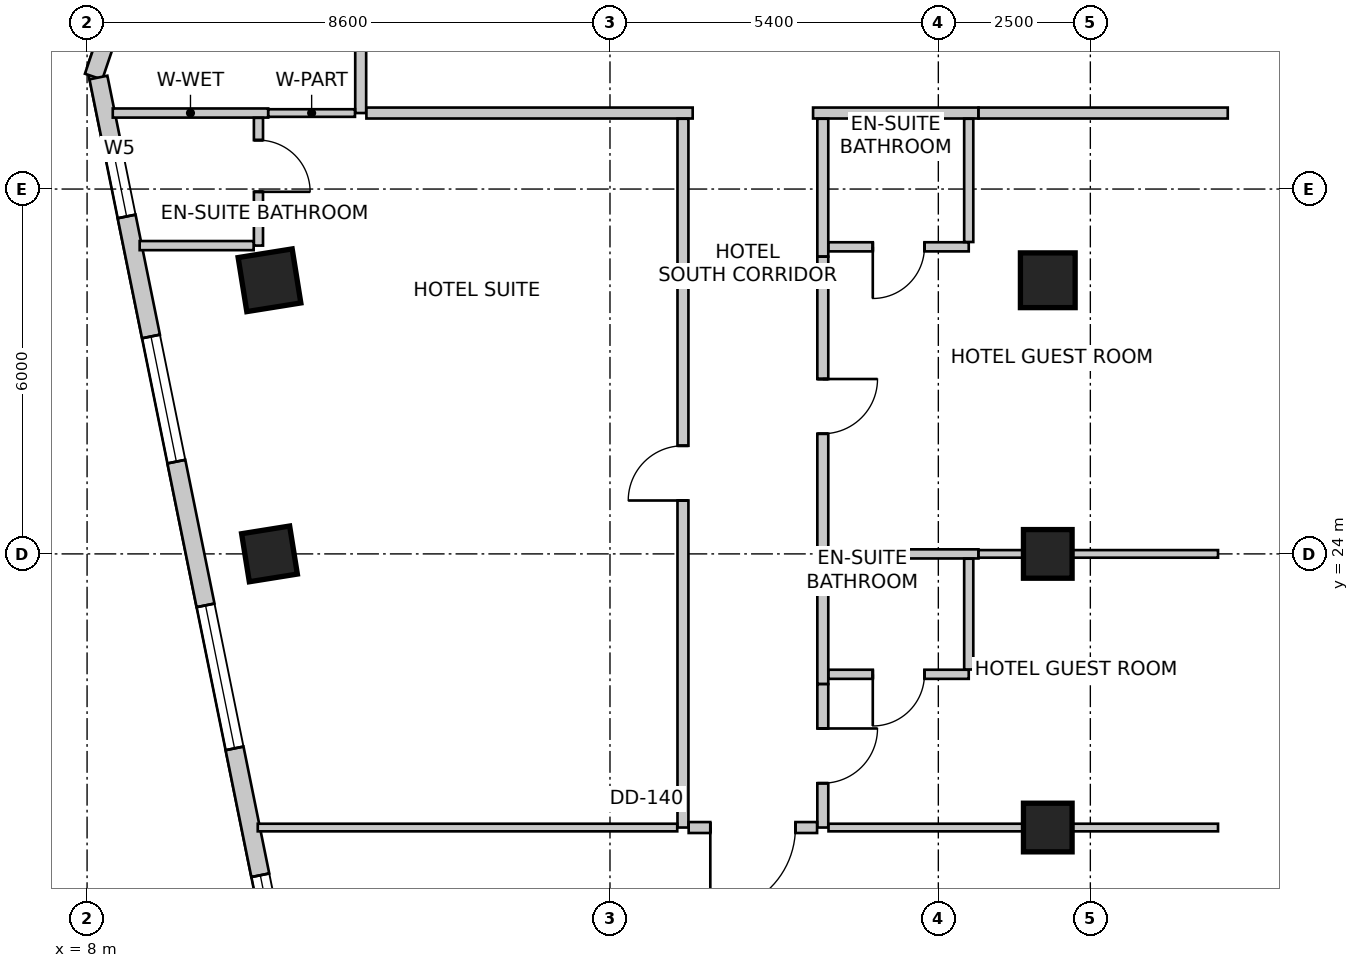
"""IFC4 building model, lengths in metres.
Left out: names, types, materials, properties, quantities, classifications, styles, units other than length and angle.
Written with IfcOpenShell. Run it as: python <this file> out.ifc"""

import sys

from ifc_helpers import new_model, si_unit, direction, frame, frame_2d, origin, origin_2d, place, context, subcontext, project, spatial, rectangle, extrude, source, transform, mapped, element, fill, save


model = new_model("IFC4")
c1 = context("Model", 3, precision=1e-05, world=origin(), true_north=direction((0.0, 1.0)))
c2 = subcontext(c1, "Body", "Model", "MODEL_VIEW")
j1 = project(units=[si_unit("LENGTHUNIT", "METRE"), si_unit("PLANEANGLEUNIT", "RADIAN")], contexts=[c1])
p1 = place(None, origin())
s1 = spatial("IfcSite", under=j1, at=p1, CompositionType="ELEMENT")
p2 = place(p1, origin())
s2 = spatial("IfcBuilding", under=s1, at=p2, CompositionType="ELEMENT")
p3 = place(p2, frame((0.0, 0.0, 146.6)))
s3 = spatial("IfcBuildingStorey", under=s2, at=p3, CompositionType="ELEMENT", Elevation=146.6)
m1 = source(origin(), c2, "Body", "SweptSolid", [
    extrude(rectangle(XDim=0.9, YDim=0.9, at=origin_2d()), origin(), (0.0, 0.0, 1.0), 3.6),
])
p4 = place(p3, frame((11.0, 28.5, 0.0), z_axis=(0.0, 0.0, 1.0), x_axis=(0.158158067254, -0.987413806751, 0.0)))
e1 = element("IfcColumn", 1, at=p4, inside=s3, PredefinedType="COLUMN", context=c2, shape_type="MappedRepresentation", body=[
    mapped(m1, transform((0.0, 0.0, 0.0), scale=1.0)),
])
m2 = source(origin(), c2, "Body", "SweptSolid", [
    extrude(rectangle(XDim=0.8, YDim=0.8, at=origin_2d()), origin(), (0.0, 0.0, 1.0), 3.6),
])
p5 = place(p3, frame((11.0, 24.0, 0.0), z_axis=(0.0, 0.0, 1.0), x_axis=(0.158158067254, -0.987413806751, 0.0)))
e2 = element("IfcColumn", 2, at=p5, inside=s3, PredefinedType="COLUMN", context=c2, shape_type="MappedRepresentation", body=[
    mapped(m2, transform((0.0, 0.0, 0.0), scale=1.0)),
])
p6 = place(p3, frame((23.8, 28.5, 0.0), z_axis=(0.0, 0.0, 1.0), x_axis=(1.0, 0.0, 0.0)))
e3 = element("IfcColumn", 3, at=p6, inside=s3, PredefinedType="COLUMN", context=c2, shape_type="MappedRepresentation", body=[
    mapped(m1, transform((0.0, 0.0, 0.0), scale=1.0)),
])
for number, where, z_axis, x_axis in (
    (4, (23.8, 24.0, 0.0), (0.0, 0.0, 1.0), (1.0, 0.0, 0.0)),
    (5, (23.8, 19.5, 0.0), (0.0, 0.0, 1.0), (1.0, 0.0, 0.0)),
):
    element("IfcColumn", number, at=place(p3, frame(where, z_axis=z_axis, x_axis=x_axis)), inside=s3, PredefinedType="COLUMN", context=c2, shape_type="MappedRepresentation", body=[
        mapped(m2, transform((0.0, 0.0, 0.0), scale=1.0)),
    ])
p7 = place(p3, frame((13.269, 47.134, 0.0), z_axis=(0.0, 0.0, 1.0), x_axis=(-0.319929773322, -0.947441259468, 0.0)))
e6 = element("IfcWall", 6, at=p7, inside=s3, PredefinedType="SOLIDWALL", context=c2, shape_type="SweptSolid", body=[
    extrude(rectangle(XDim=16.134, YDim=0.3, at=frame_2d((8.067, 0.0))), origin(), (0.0, 0.0, 1.0), 3.35),
])
m3 = source(origin(), c2, "Body", "SweptSolid", [
    extrude(rectangle(XDim=2.4, YDim=2.2, at=frame_2d((1.2, 1.1))), frame((0.0, 0.16, 0.0), z_axis=(0.0, -1.0, 0.0), x_axis=(1.0, 0.0, 0.0)), (0.0, 0.0, 1.0), 0.32),
])
p8 = place(p7, frame((2.276, 0.0, 0.85)))
e7 = element("IfcOpeningElement", 7, at=p8, cuts=e6, PredefinedType="OPENING", context=c2, shape_type="MappedRepresentation", body=[
    mapped(m3, transform((0.0, 0.0, 0.0), scale=1.0)),
])
m4 = source(origin(), c2, "Body", "SweptSolid", [
    extrude(rectangle(XDim=2.1, YDim=2.0, at=frame_2d((1.05, 1.0))), frame((0.0, 0.16, 0.0), z_axis=(0.0, -1.0, 0.0), x_axis=(1.0, 0.0, 0.0)), (0.0, 0.0, 1.0), 0.32),
])
p9 = place(p7, frame((7.361, 0.0, 0.85)))
e8 = element("IfcOpeningElement", 8, at=p9, cuts=e6, PredefinedType="OPENING", context=c2, shape_type="MappedRepresentation", body=[
    mapped(m4, transform((0.0, 0.0, 0.0), scale=1.0)),
])
p10 = place(p7, frame((12.146, 0.0, 0.85)))
e9 = element("IfcOpeningElement", 9, at=p10, cuts=e6, PredefinedType="OPENING", context=c2, shape_type="MappedRepresentation", body=[
    mapped(m3, transform((0.0, 0.0, 0.0), scale=1.0)),
])
p11 = place(p3, frame((8.187, 31.834, 0.0), z_axis=(0.0, 0.0, 1.0), x_axis=(0.198869838988, -0.980025911464, 0.0)))
e10 = element("IfcWall", 10, at=p11, inside=s3, PredefinedType="SOLIDWALL", context=c2, shape_type="SweptSolid", body=[
    extrude(rectangle(XDim=16.363, YDim=0.3, at=frame_2d((8.182, 0.0))), origin(), (0.0, 0.0, 1.0), 3.35),
])
m5 = source(origin(), c2, "Body", "SweptSolid", [
    extrude(rectangle(XDim=1.2, YDim=1.6, at=frame_2d((0.6, 0.8))), frame((0.0, 0.16, 0.0), z_axis=(0.0, -1.0, 0.0), x_axis=(1.0, 0.0, 0.0)), (0.0, 0.0, 1.0), 0.32),
])
p12 = place(p11, frame((1.131, 0.0, 0.85)))
e11 = element("IfcOpeningElement", 11, at=p12, cuts=e10, PredefinedType="OPENING", context=c2, shape_type="MappedRepresentation", body=[
    mapped(m5, transform((0.0, 0.0, 0.0), scale=1.0)),
])
p13 = place(p11, frame((4.345, 0.0, 0.85)))
e12 = element("IfcOpeningElement", 12, at=p13, cuts=e10, PredefinedType="OPENING", context=c2, shape_type="MappedRepresentation", body=[
    mapped(m4, transform((0.0, 0.0, 0.0), scale=1.0)),
])
p14 = place(p11, frame((8.857, 0.0, 0.85)))
e13 = element("IfcOpeningElement", 13, at=p14, cuts=e10, PredefinedType="OPENING", context=c2, shape_type="MappedRepresentation", body=[
    mapped(m3, transform((0.0, 0.0, 0.0), scale=1.0)),
])
p15 = place(p11, frame((13.386, 0.0, 0.85)))
e14 = element("IfcOpeningElement", 14, at=p15, cuts=e10, PredefinedType="OPENING", context=c2, shape_type="MappedRepresentation", body=[
    mapped(m4, transform((0.0, 0.0, 0.0), scale=1.0)),
])
p16 = place(p3, frame((12.5, 31.25, 0.0), z_axis=(0.0, 0.0, 1.0), x_axis=(0.0, 1.0, 0.0)))
e15 = element("IfcWall", 15, at=p16, inside=s3, PredefinedType="PARTITIONING", context=c2, shape_type="SweptSolid", body=[
    extrude(rectangle(XDim=2.2, YDim=0.18, at=frame_2d((1.1, 0.0))), origin(), (0.0, 0.0, 1.0), 2.935),
])
p17 = place(p3, frame((17.96, 31.25, 0.0), z_axis=(0.0, 0.0, 1.0), x_axis=(-1.0, 0.0, 0.0)))
e16 = element("IfcWall", 16, at=p17, inside=s3, PredefinedType="PARTITIONING", context=c2, shape_type="SweptSolid", body=[
    extrude(rectangle(XDim=5.366, YDim=0.18, at=frame_2d((2.683, 0.0))), origin(), (0.0, 0.0, 1.0), 2.935),
])
p18 = place(p3, frame((22.66, 31.25, 0.0), z_axis=(0.0, 0.0, 1.0), x_axis=(-1.0, 0.0, 0.0)))
e17 = element("IfcWall", 17, at=p18, inside=s3, PredefinedType="PARTITIONING", context=c2, shape_type="SweptSolid", body=[
    extrude(rectangle(XDim=2.72, YDim=0.18, at=frame_2d((1.36, 0.0))), origin(), (0.0, 0.0, 1.0), 2.935),
])
p19 = place(p3, frame((26.76, 31.25, 0.0), z_axis=(0.0, 0.0, 1.0), x_axis=(-1.0, 0.0, 0.0)))
e18 = element("IfcWall", 18, at=p19, inside=s3, PredefinedType="PARTITIONING", context=c2, shape_type="SweptSolid", body=[
    extrude(rectangle(XDim=4.098, YDim=0.18, at=frame_2d((2.049, 0.0))), origin(), (0.0, 0.0, 1.0), 3.35),
])
p20 = place(p3, frame((10.979, 31.25, 0.0), z_axis=(0.0, 0.0, 1.0), x_axis=(-1.0, 0.0, 0.0)))
e19 = element("IfcWall", 19, at=p20, inside=s3, PredefinedType="PARTITIONING", context=c2, shape_type="SweptSolid", body=[
    extrude(rectangle(XDim=2.556, YDim=0.15, at=frame_2d((1.278, 0.0))), origin(), (0.0, 0.0, 1.0), 2.492),
])
p21 = place(p3, frame((12.406, 31.25, 0.0), z_axis=(0.0, 0.0, 1.0), x_axis=(-1.0, 0.0, 0.0)))
e20 = element("IfcWall", 20, at=p21, inside=s3, PredefinedType="PARTITIONING", context=c2, shape_type="SweptSolid", body=[
    extrude(rectangle(XDim=1.426, YDim=0.125, at=frame_2d((0.713, 0.0))), origin(), (0.0, 0.0, 1.0), 2.492),
])
p22 = place(p3, frame((17.8, 19.5, 0.0), z_axis=(0.0, 0.0, 1.0), x_axis=(0.0, 1.0, 0.0)))
e21 = element("IfcWall", 21, at=p22, inside=s3, PredefinedType="PARTITIONING", context=c2, shape_type="SweptSolid", body=[
    extrude(rectangle(XDim=11.656, YDim=0.18, at=frame_2d((5.828, 0.0))), origin(), (0.0, 0.0, 1.0), 2.788),
])
m6 = source(origin(), c2, "Body", "SweptSolid", [
    extrude(rectangle(XDim=0.9, YDim=2.15, at=frame_2d((0.45, 1.075))), frame((0.0, 0.1, 0.0), z_axis=(0.0, -1.0, 0.0), x_axis=(1.0, 0.0, 0.0)), (0.0, 0.0, 1.0), 0.2),
])
p23 = place(p22, frame((5.378, 0.0, 0.0)))
e22 = element("IfcOpeningElement", 22, at=p23, cuts=e21, PredefinedType="OPENING", context=c2, shape_type="MappedRepresentation", body=[
    mapped(m6, transform((0.0, 0.0, 0.0), scale=1.0)),
])
p24 = place(p3, frame((20.1, 31.156, 0.0), z_axis=(0.0, 0.0, 1.0), x_axis=(0.0, -1.0, 0.0)))
e23 = element("IfcWall", 23, at=p24, inside=s3, PredefinedType="PARTITIONING", context=c2, shape_type="SweptSolid", body=[
    extrude(rectangle(XDim=2.266, YDim=0.18, at=frame_2d((1.133, 0.0))), origin(), (0.0, 0.0, 1.0), 2.935),
])
p25 = place(p3, frame((20.1, 28.888, 0.0), z_axis=(0.0, 0.0, 1.0), x_axis=(0.0, -1.0, 0.0)))
e24 = element("IfcWall", 24, at=p25, inside=s3, PredefinedType="PARTITIONING", context=c2, shape_type="SweptSolid", body=[
    extrude(rectangle(XDim=5.048, YDim=0.18, at=frame_2d((2.524, 0.0))), origin(), (0.0, 0.0, 1.0), 2.788),
])
p26 = place(p25, frame((2.012, 0.0, 0.0)))
e25 = element("IfcOpeningElement", 25, at=p26, cuts=e24, PredefinedType="OPENING", context=c2, shape_type="MappedRepresentation", body=[
    mapped(m6, transform((0.0, 0.0, 0.0), scale=1.0)),
])
p27 = place(p3, frame((20.1, 23.838, 0.0), z_axis=(0.0, 0.0, 1.0), x_axis=(0.0, -1.0, 0.0)))
e26 = element("IfcWall", 26, at=p27, inside=s3, PredefinedType="PARTITIONING", context=c2, shape_type="SweptSolid", body=[
    extrude(rectangle(XDim=1.978, YDim=0.18, at=frame_2d((0.989, 0.0))), origin(), (0.0, 0.0, 1.0), 3.35),
])
p28 = place(p3, frame((20.1, 21.858, 0.0), z_axis=(0.0, 0.0, 1.0), x_axis=(0.0, -1.0, 0.0)))
e27 = element("IfcWall", 27, at=p28, inside=s3, PredefinedType="PARTITIONING", context=c2, shape_type="SweptSolid", body=[
    extrude(rectangle(XDim=2.358, YDim=0.18, at=frame_2d((1.179, 0.0))), origin(), (0.0, 0.0, 1.0), 2.788),
])
p29 = place(p28, frame((0.729, 0.0, 0.0)))
e28 = element("IfcOpeningElement", 28, at=p29, cuts=e27, PredefinedType="OPENING", context=c2, shape_type="MappedRepresentation", body=[
    mapped(m6, transform((0.0, 0.0, 0.0), scale=1.0)),
])
p30 = place(p3, frame((20.006, 19.5, 0.0), z_axis=(0.0, 0.0, 1.0), x_axis=(-1.0, 0.0, 0.0)))
e29 = element("IfcWall", 29, at=p30, inside=s3, PredefinedType="PARTITIONING", context=c2, shape_type="SweptSolid", body=[
    extrude(rectangle(XDim=2.112, YDim=0.18, at=frame_2d((1.056, 0.0))), origin(), (0.0, 0.0, 1.0), 3.35),
])
m7 = source(origin(), c2, "Body", "SweptSolid", [
    extrude(rectangle(XDim=1.4, YDim=2.15, at=frame_2d((0.7, 1.075))), frame((0.0, 0.1, 0.0), z_axis=(0.0, -1.0, 0.0), x_axis=(1.0, 0.0, 0.0)), (0.0, 0.0, 1.0), 0.2),
])
p31 = place(p30, frame((0.356, 0.0, 0.0)))
e30 = element("IfcOpeningElement", 30, at=p31, cuts=e29, PredefinedType="OPENING", context=c2, shape_type="MappedRepresentation", body=[
    mapped(m7, transform((0.0, 0.0, 0.0), scale=1.0)),
])
p32 = place(p3, frame((10.819, 31.171, 0.0), z_axis=(0.0, 0.0, 1.0), x_axis=(0.0, -1.0, 0.0)))
e31 = element("IfcWall", 31, at=p32, inside=s3, PredefinedType="PARTITIONING", context=c2, shape_type="SweptSolid", body=[
    extrude(rectangle(XDim=2.101, YDim=0.15, at=frame_2d((1.05, 0.0))), origin(), (0.0, 0.0, 1.0), 2.492),
])
m8 = source(origin(), c2, "Body", "SweptSolid", [
    extrude(rectangle(XDim=0.85, YDim=2.15, at=frame_2d((0.425, 1.075))), frame((0.0, 0.085, 0.0), z_axis=(0.0, -1.0, 0.0), x_axis=(1.0, 0.0, 0.0)), (0.0, 0.0, 1.0), 0.17),
])
p33 = place(p32, frame((0.366, 0.0, 0.0)))
e32 = element("IfcOpeningElement", 32, at=p33, cuts=e31, PredefinedType="OPENING", context=c2, shape_type="MappedRepresentation", body=[
    mapped(m8, transform((0.0, 0.0, 0.0), scale=1.0)),
])
p34 = place(p3, frame((10.74, 29.07, 0.0), z_axis=(0.0, 0.0, 1.0), x_axis=(-1.0, 0.0, 0.0)))
e33 = element("IfcWall", 33, at=p34, inside=s3, PredefinedType="PARTITIONING", context=c2, shape_type="SweptSolid", body=[
    extrude(rectangle(XDim=1.875, YDim=0.15, at=frame_2d((0.937, 0.0))), origin(), (0.0, 0.0, 1.0), 3.35),
])
p35 = place(p3, frame((17.706, 19.5, 0.0), z_axis=(0.0, 0.0, 1.0), x_axis=(-1.0, 0.0, 0.0)))
e34 = element("IfcWall", 34, at=p35, inside=s3, PredefinedType="PARTITIONING", context=c2, shape_type="SweptSolid", body=[
    extrude(rectangle(XDim=6.899, YDim=0.125, at=frame_2d((3.45, 0.0))), origin(), (0.0, 0.0, 1.0), 3.35),
])
p36 = place(p3, frame((22.5, 29.05, 0.0), z_axis=(0.0, 0.0, 1.0), x_axis=(-1.0, 0.0, 0.0)))
e35 = element("IfcWall", 35, at=p36, inside=s3, PredefinedType="PARTITIONING", context=c2, shape_type="SweptSolid", body=[
    extrude(rectangle(XDim=2.306, YDim=0.15, at=frame_2d((1.153, 0.0))), origin(), (0.0, 0.0, 1.0), 2.935),
])
p37 = place(p36, frame((0.728, 0.0, 0.0)))
e36 = element("IfcOpeningElement", 36, at=p37, cuts=e35, PredefinedType="OPENING", context=c2, shape_type="MappedRepresentation", body=[
    mapped(m8, transform((0.0, 0.0, 0.0), scale=1.0)),
])
p38 = place(p3, frame((22.5, 31.156, 0.0), z_axis=(0.0, 0.0, 1.0), x_axis=(0.0, -1.0, 0.0)))
e37 = element("IfcWall", 37, at=p38, inside=s3, PredefinedType="PARTITIONING", context=c2, shape_type="SweptSolid", body=[
    extrude(rectangle(XDim=2.027, YDim=0.15, at=frame_2d((1.014, 0.0))), origin(), (0.0, 0.0, 1.0), 2.935),
])
p39 = place(p3, frame((22.66, 24.0, 0.0), z_axis=(0.0, 0.0, 1.0), x_axis=(-1.0, 0.0, 0.0)))
e38 = element("IfcWall", 38, at=p39, inside=s3, PredefinedType="PARTITIONING", context=c2, shape_type="SweptSolid", body=[
    extrude(rectangle(XDim=2.466, YDim=0.15, at=frame_2d((1.233, 0.0))), origin(), (0.0, 0.0, 1.0), 2.803),
])
p40 = place(p3, frame((26.6, 24.0, 0.0), z_axis=(0.0, 0.0, 1.0), x_axis=(-1.0, 0.0, 0.0)))
e39 = element("IfcWall", 39, at=p40, inside=s3, PredefinedType="PARTITIONING", context=c2, shape_type="SweptSolid", body=[
    extrude(rectangle(XDim=3.938, YDim=0.125, at=frame_2d((1.969, 0.0))), origin(), (0.0, 0.0, 1.0), 2.492),
])
p41 = place(p3, frame((22.5, 22.02, 0.0), z_axis=(0.0, 0.0, 1.0), x_axis=(-1.0, 0.0, 0.0)))
e40 = element("IfcWall", 40, at=p41, inside=s3, PredefinedType="PARTITIONING", context=c2, shape_type="SweptSolid", body=[
    extrude(rectangle(XDim=2.306, YDim=0.15, at=frame_2d((1.153, 0.0))), origin(), (0.0, 0.0, 1.0), 3.35),
])
p42 = place(p41, frame((0.728, 0.0, 0.0)))
e41 = element("IfcOpeningElement", 41, at=p42, cuts=e40, PredefinedType="OPENING", context=c2, shape_type="MappedRepresentation", body=[
    mapped(m8, transform((0.0, 0.0, 0.0), scale=1.0)),
])
p43 = place(p3, frame((22.5, 23.921, 0.0), z_axis=(0.0, 0.0, 1.0), x_axis=(0.0, -1.0, 0.0)))
e42 = element("IfcWall", 42, at=p43, inside=s3, PredefinedType="PARTITIONING", context=c2, shape_type="SweptSolid", body=[
    extrude(rectangle(XDim=1.822, YDim=0.15, at=frame_2d((0.911, 0.0))), origin(), (0.0, 0.0, 1.0), 3.35),
])
p44 = place(p3, frame((26.6, 19.5, 0.0), z_axis=(0.0, 0.0, 1.0), x_axis=(-1.0, 0.0, 0.0)))
e43 = element("IfcWall", 43, at=p44, inside=s3, PredefinedType="PARTITIONING", context=c2, shape_type="SweptSolid", body=[
    extrude(rectangle(XDim=6.406, YDim=0.125, at=frame_2d((3.203, 0.0))), origin(), (0.0, 0.0, 1.0), 2.492),
])
m9 = source(origin(), c2, "Body", "SweptSolid", [
    extrude(rectangle(XDim=1.2, YDim=1.6, at=frame_2d((0.6, 0.8))), frame((0.0, -0.015, 0.0), z_axis=(0.0, -1.0, 0.0), x_axis=(1.0, 0.0, 0.0)), (0.0, 0.0, 1.0), 0.06),
])
p45 = place(p12, origin())
e44 = element("IfcWindow", 44, at=p45, inside=s3, PartitioningType="SINGLE_PANEL", PredefinedType="WINDOW", context=c2, shape_type="MappedRepresentation", body=[
    mapped(m9, transform((0.0, 0.0, 0.0), scale=1.0)),
])
fill(e11, e44)
m10 = source(origin(), c2, "Body", "SweptSolid", [
    extrude(rectangle(XDim=2.1, YDim=2.0, at=frame_2d((1.05, 1.0))), frame((0.0, -0.015, 0.0), z_axis=(0.0, -1.0, 0.0), x_axis=(1.0, 0.0, 0.0)), (0.0, 0.0, 1.0), 0.06),
])
p46 = place(p13, origin())
e45 = element("IfcWindow", 45, at=p46, inside=s3, PartitioningType="SINGLE_PANEL", PredefinedType="WINDOW", context=c2, shape_type="MappedRepresentation", body=[
    mapped(m10, transform((0.0, 0.0, 0.0), scale=1.0)),
])
fill(e12, e45)
m11 = source(origin(), c2, "Body", "SweptSolid", [
    extrude(rectangle(XDim=2.4, YDim=2.2, at=frame_2d((1.2, 1.1))), frame((0.0, -0.015, 0.0), z_axis=(0.0, -1.0, 0.0), x_axis=(1.0, 0.0, 0.0)), (0.0, 0.0, 1.0), 0.06),
])
p47 = place(p14, origin())
e46 = element("IfcWindow", 46, at=p47, inside=s3, PartitioningType="SINGLE_PANEL", PredefinedType="WINDOW", context=c2, shape_type="MappedRepresentation", body=[
    mapped(m11, transform((0.0, 0.0, 0.0), scale=1.0)),
])
fill(e13, e46)
p48 = place(p15, origin())
e47 = element("IfcWindow", 47, at=p48, inside=s3, PartitioningType="SINGLE_PANEL", PredefinedType="WINDOW", context=c2, shape_type="MappedRepresentation", body=[
    mapped(m10, transform((0.0, 0.0, 0.0), scale=1.0)),
])
fill(e14, e47)
m12 = source(origin(), c2, "Body", "SweptSolid", [
    extrude(rectangle(XDim=0.85, YDim=2.15, at=frame_2d((0.425, 1.075))), frame((0.0, 0.025, 0.0), z_axis=(0.0, -1.0, 0.0), x_axis=(1.0, 0.0, 0.0)), (0.0, 0.0, 1.0), 0.05),
])
p49 = place(p33, origin())
e48 = element("IfcDoor", 48, at=p49, inside=s3, OperationType="SINGLE_SWING_RIGHT", PredefinedType="DOOR", context=c2, shape_type="MappedRepresentation", body=[
    mapped(m12, transform((0.0, 0.0, 0.0), scale=1.0)),
])
fill(e32, e48)
m13 = source(origin(), c2, "Body", "SweptSolid", [
    extrude(rectangle(XDim=0.9, YDim=2.15, at=frame_2d((0.45, 1.075))), frame((0.0, 0.025, 0.0), z_axis=(0.0, -1.0, 0.0), x_axis=(1.0, 0.0, 0.0)), (0.0, 0.0, 1.0), 0.05),
])
p50 = place(p23, origin())
e49 = element("IfcDoor", 49, at=p50, inside=s3, OperationType="SINGLE_SWING_LEFT", PredefinedType="DOOR", context=c2, shape_type="MappedRepresentation", body=[
    mapped(m13, transform((0.0, 0.0, 0.0), scale=1.0)),
])
fill(e22, e49)
p51 = place(p37, origin())
e50 = element("IfcDoor", 50, at=p51, inside=s3, OperationType="SINGLE_SWING_RIGHT", PredefinedType="DOOR", context=c2, shape_type="MappedRepresentation", body=[
    mapped(m12, transform((0.0, 0.0, 0.0), scale=1.0)),
])
fill(e36, e50)
p52 = place(p26, origin())
e51 = element("IfcDoor", 51, at=p52, inside=s3, OperationType="SINGLE_SWING_LEFT", PredefinedType="DOOR", context=c2, shape_type="MappedRepresentation", body=[
    mapped(m13, transform((0.0, 0.0, 0.0), scale=1.0)),
])
fill(e25, e51)
p53 = place(p42, origin())
e52 = element("IfcDoor", 52, at=p53, inside=s3, OperationType="SINGLE_SWING_RIGHT", PredefinedType="DOOR", context=c2, shape_type="MappedRepresentation", body=[
    mapped(m12, transform((0.0, 0.0, 0.0), scale=1.0)),
])
fill(e41, e52)
p54 = place(p29, origin())
e53 = element("IfcDoor", 53, at=p54, inside=s3, OperationType="SINGLE_SWING_LEFT", PredefinedType="DOOR", context=c2, shape_type="MappedRepresentation", body=[
    mapped(m13, transform((0.0, 0.0, 0.0), scale=1.0)),
])
fill(e28, e53)
m14 = source(origin(), c2, "Body", "SweptSolid", [
    extrude(rectangle(XDim=1.4, YDim=2.15, at=frame_2d((0.7, 1.075))), frame((0.0, 0.025, 0.0), z_axis=(0.0, -1.0, 0.0), x_axis=(1.0, 0.0, 0.0)), (0.0, 0.0, 1.0), 0.05),
])
p55 = place(p31, origin())
e54 = element("IfcDoor", 54, at=p55, inside=s3, OperationType="SINGLE_SWING_RIGHT", PredefinedType="DOOR", context=c2, shape_type="MappedRepresentation", body=[
    mapped(m14, transform((0.0, 0.0, 0.0), scale=1.0)),
])
fill(e30, e54)
save(model, sys.argv[1])
